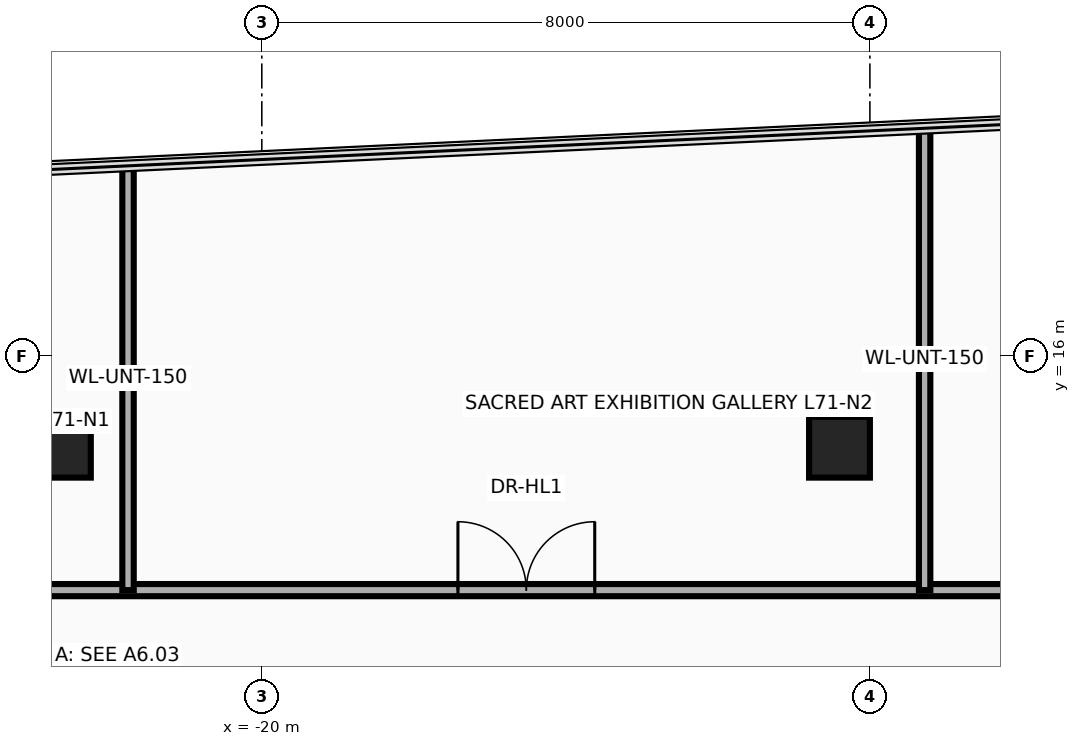
"""IFC4 building model, lengths in metres.
Left out: names, types, materials, properties, quantities, classifications, styles, units other than length and angle.
Written with IfcOpenShell. Run it as: python <this file> out.ifc"""

import sys

from ifc_helpers import new_model, si_unit, direction, frame, frame_2d, origin, origin_2d, place, context, subcontext, project, spatial, rectangle, extrude, source, transform, mapped, element, fill, save


model = new_model("IFC4")
c1 = context("Model", 3, precision=1e-05, world=origin(), true_north=direction((0.0, 1.0)))
c2 = subcontext(c1, "Body", "Model", "MODEL_VIEW")
j1 = project(units=[si_unit("LENGTHUNIT", "METRE"), si_unit("PLANEANGLEUNIT", "RADIAN")], contexts=[c1])
p1 = place(None, origin())
s1 = spatial("IfcSite", under=j1, at=p1, CompositionType="ELEMENT")
p2 = place(p1, origin())
s2 = spatial("IfcBuilding", under=s1, at=p2, CompositionType="ELEMENT")
p3 = place(p2, frame((0.0, 0.0, 273.0)))
s3 = spatial("IfcBuildingStorey", under=s2, at=p3, CompositionType="ELEMENT", Elevation=273.0)
m1 = source(origin(), c2, "Body", "SweptSolid", [
    extrude(rectangle(XDim=0.8, YDim=0.8, at=origin_2d()), origin(), (0.0, 0.0, 1.0), 3.5),
])
for number, where, z_axis, x_axis in (
    (1, (-22.65, 14.8, 0.0), (0.0, 0.0, 1.0), (1.0, 0.0, 0.0)),
    (2, (-12.4, 14.8, 0.0), (0.0, 0.0, 1.0), (1.0, 0.0, 0.0)),
):
    element("IfcColumn", number, at=place(p3, frame(where, z_axis=z_axis, x_axis=x_axis)), inside=s3, PredefinedType="COLUMN", context=c2, shape_type="MappedRepresentation", body=[
        mapped(m1, transform((0.0, 0.0, 0.0), x_axis=(1.0, 0.0, 0.0), y_axis=(0.0, 1.0, 0.0), z_axis=(0.0, 0.0, 1.0), scale=1.0)),
    ])
p4 = place(p3, frame((-30.39, 12.92, 0.0), z_axis=(0.0, 0.0, 1.0), x_axis=(1.0, 0.0, 0.0)))
e3 = element("IfcWall", 3, at=p4, inside=s3, PredefinedType="PARTITIONING", context=c2, shape_type="SweptSolid", body=[
    extrude(rectangle(XDim=29.48, YDim=0.16, at=frame_2d((14.74, 0.0))), origin(), (0.0, 0.0, 1.0), 2.634),
])
p5 = place(p4, frame((3.415, 0.0, 0.0)))
e4 = element("IfcOpeningElement", 4, at=p5, cuts=e3, PredefinedType="OPENING", context=c2, shape_type="SweptSolid", body=[
    extrude(rectangle(XDim=1.8, YDim=2.15, at=frame_2d((0.9, 1.075))), frame((0.0, 0.095, 0.0), z_axis=(0.0, -1.0, 0.0), x_axis=(1.0, 0.0, 0.0)), (0.0, 0.0, 1.0), 0.19),
])
p6 = place(p4, frame((12.97, 0.0, 0.0)))
e5 = element("IfcOpeningElement", 5, at=p6, cuts=e3, PredefinedType="OPENING", context=c2, shape_type="SweptSolid", body=[
    extrude(rectangle(XDim=1.8, YDim=2.15, at=frame_2d((0.9, 1.075))), frame((0.0, 0.095, 0.0), z_axis=(0.0, -1.0, 0.0), x_axis=(1.0, 0.0, 0.0)), (0.0, 0.0, 1.0), 0.19),
])
p7 = place(p4, frame((23.395, 0.0, 0.0)))
e6 = element("IfcOpeningElement", 6, at=p7, cuts=e3, PredefinedType="OPENING", context=c2, shape_type="SweptSolid", body=[
    extrude(rectangle(XDim=1.8, YDim=2.15, at=frame_2d((0.9, 1.075))), frame((0.0, 0.095, 0.0), z_axis=(0.0, -1.0, 0.0), x_axis=(1.0, 0.0, 0.0)), (0.0, 0.0, 1.0), 0.19),
])
p8 = place(p3, frame((-21.76, 12.92, 0.0), z_axis=(0.0, 0.0, 1.0), x_axis=(0.0, 1.0, 0.0)))
e7 = element("IfcWall", 7, at=p8, inside=s3, PredefinedType="PARTITIONING", context=c2, shape_type="SweptSolid", body=[
    extrude(rectangle(XDim=5.582, YDim=0.15, at=frame_2d((2.791, 0.0))), origin(), (0.0, 0.0, 1.0), 2.623),
])
p9 = place(p3, frame((-11.28, 12.92, 0.0), z_axis=(0.0, 0.0, 1.0), x_axis=(0.0, 1.0, 0.0)))
e8 = element("IfcWall", 8, at=p9, inside=s3, PredefinedType="PARTITIONING", context=c2, shape_type="SweptSolid", body=[
    extrude(rectangle(XDim=6.076, YDim=0.15, at=frame_2d((3.038, 0.0))), origin(), (0.0, 0.0, 1.0), 3.26),
])
p10 = place(p6, origin())
e9 = element("IfcDoor", 9, at=p10, inside=s3, OperationType="DOUBLE_DOOR_SINGLE_SWING", PredefinedType="DOOR", context=c2, shape_type="SweptSolid", body=[
    extrude(rectangle(XDim=1.8, YDim=2.15, at=frame_2d((0.9, 1.075))), frame((0.0, 0.025, 0.0), z_axis=(0.0, -1.0, 0.0), x_axis=(1.0, 0.0, 0.0)), (0.0, 0.0, 1.0), 0.05),
])
fill(e5, e9)
save(model, sys.argv[1])
